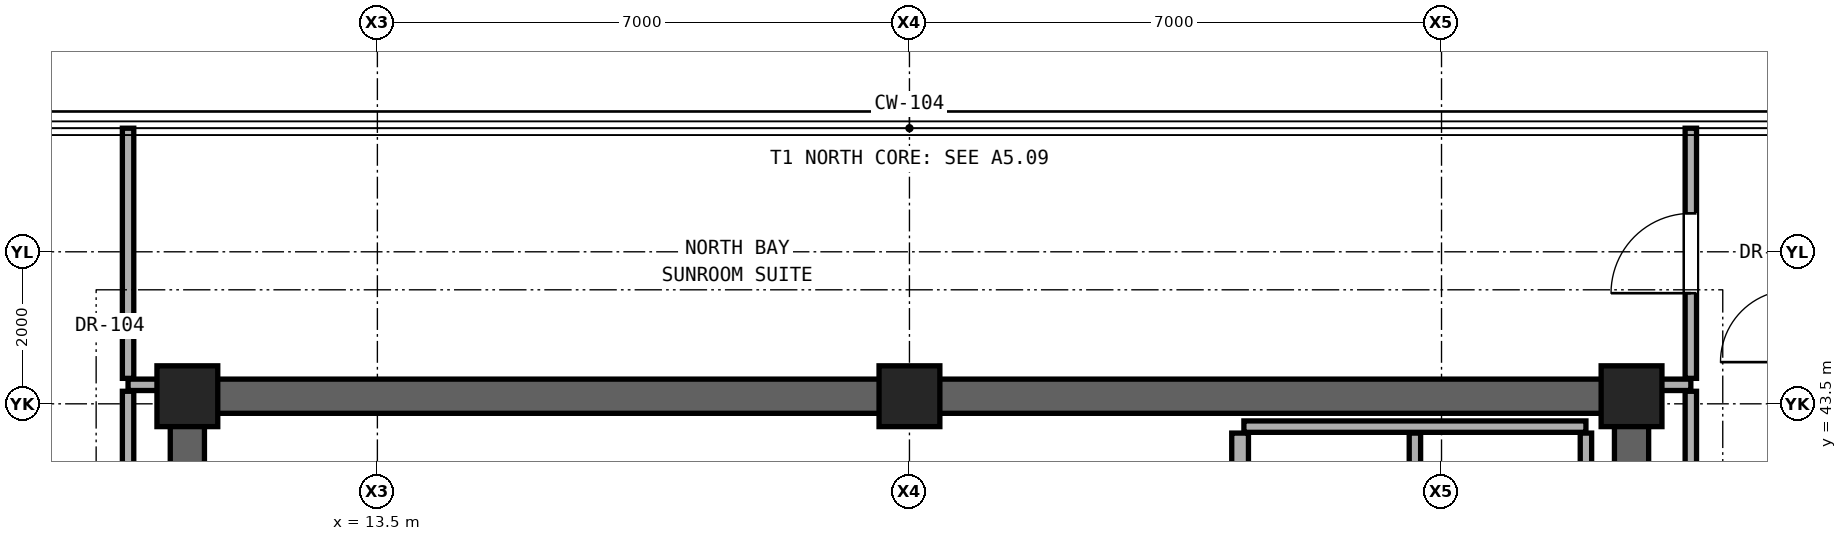
"""IFC4 building model, lengths in metres.
Left out: names, types, materials, properties, quantities, classifications, styles, units other than length and angle.
Written with IfcOpenShell. Run it as: python <this file> out.ifc"""

import sys

from ifc_helpers import new_model, si_unit, direction, frame, frame_2d, origin, origin_2d, place, context, subcontext, project, spatial, rectangle, extrude, element, fill, save


model = new_model("IFC4")
c1 = context("Model", 3, precision=1e-05, world=origin(), true_north=direction((0.0, 1.0)))
c2 = subcontext(c1, "Body", "Model", "MODEL_VIEW")
j1 = project(units=[si_unit("LENGTHUNIT", "METRE"), si_unit("PLANEANGLEUNIT", "RADIAN")], contexts=[c1])
p1 = place(None, origin())
s1 = spatial("IfcSite", under=j1, at=p1, CompositionType="ELEMENT")
p2 = place(p1, origin())
s2 = spatial("IfcBuilding", under=s1, at=p2, CompositionType="ELEMENT")
p3 = place(p2, frame((0.0, 0.0, 242.5)))
s3 = spatial("IfcBuildingStorey", under=s2, at=p3, CompositionType="ELEMENT", Elevation=242.5)
for number, where, z_axis, x_axis in (
    (1, (11.0, 43.6, 0.0), (0.0, 0.0, 1.0), (1.0, 0.0, 0.0)),
    (2, (20.5, 43.6, 0.0), (0.0, 0.0, 1.0), (1.0, 0.0, 0.0)),
    (3, (30.0, 43.6, 0.0), (0.0, 0.0, 1.0), (1.0, 0.0, 0.0)),
):
    element("IfcColumn", number, at=place(p3, frame(where, z_axis=z_axis, x_axis=x_axis)), inside=s3, PredefinedType="COLUMN", context=c2, shape_type="SweptSolid", body=[
        extrude(rectangle(XDim=0.8, YDim=0.8, at=origin_2d()), origin(), (0.0, 0.0, 1.0), 3.3),
    ])
p4 = place(p3, frame((11.0, 43.6, 0.0), z_axis=(0.0, 0.0, 1.0), x_axis=(1.0, 0.0, 0.0)))
e4 = element("IfcWall", 4, at=p4, inside=s3, PredefinedType="SHEAR", context=c2, shape_type="SweptSolid", body=[
    extrude(rectangle(XDim=19.0, YDim=0.45, at=frame_2d((9.5, 0.0))), origin(), (0.0, 0.0, 1.0), 3.1),
])
for number, where, z_axis, x_axis in (
    (5, (11.0, 37.6, 0.0), (0.0, 0.0, 1.0), (0.0, 1.0, 0.0)),
    (6, (30.0, 37.6, 0.0), (0.0, 0.0, 1.0), (0.0, 1.0, 0.0)),
):
    element("IfcWall", number, at=place(p3, frame(where, z_axis=z_axis, x_axis=x_axis)), inside=s3, PredefinedType="SHEAR", context=c2, shape_type="SweptSolid", body=[
        extrude(rectangle(XDim=6.0, YDim=0.45, at=frame_2d((3.0, 0.0))), origin(), (0.0, 0.0, 1.0), 3.1),
    ])
p5 = place(p3, frame((24.9, 43.2, 0.0), z_axis=(0.0, 0.0, 1.0), x_axis=(1.0, 0.0, 0.0)))
e7 = element("IfcWall", 7, at=p5, inside=s3, PredefinedType="PARTITIONING", context=c2, shape_type="SweptSolid", body=[
    extrude(rectangle(XDim=4.5, YDim=0.15, at=frame_2d((2.25, 0.0))), origin(), (0.0, 0.0, 1.0), 3.1),
])
for number, where, z_axis, x_axis in (
    (8, (10.22, 43.75, 0.0), (0.0, 0.0, 1.0), (1.0, 0.0, 0.0)),
    (9, (30.22, 43.75, 0.0), (0.0, 0.0, 1.0), (1.0, 0.0, 0.0)),
):
    element("IfcWall", number, at=place(p3, frame(where, z_axis=z_axis, x_axis=x_axis)), inside=s3, PredefinedType="PARTITIONING", context=c2, shape_type="SweptSolid", body=[
        extrude(rectangle(XDim=0.56, YDim=0.15, at=frame_2d((0.28, 0.0))), origin(), (0.0, 0.0, 1.0), 3.1),
    ])
p6 = place(p3, frame((10.22, 34.535, 0.0), z_axis=(0.0, 0.0, 1.0), x_axis=(0.0, 1.0, 0.0)))
e10 = element("IfcWall", 10, at=p6, inside=s3, PredefinedType="PARTITIONING", context=c2, shape_type="SweptSolid", body=[
    extrude(rectangle(XDim=9.13, YDim=0.15, at=frame_2d((4.565, 0.0))), origin(), (0.0, 0.0, 1.0), 2.492),
])
p7 = place(p3, frame((10.22, 43.835, 0.0), z_axis=(0.0, 0.0, 1.0), x_axis=(0.0, 1.0, 0.0)))
e11 = element("IfcWall", 11, at=p7, inside=s3, PredefinedType="PARTITIONING", context=c2, shape_type="SweptSolid", body=[
    extrude(rectangle(XDim=3.291, YDim=0.15, at=frame_2d((1.646, 0.0))), origin(), (0.0, 0.0, 1.0), 3.1),
])
p8 = place(p3, frame((24.85, 40.26, 0.0), z_axis=(0.0, 0.0, 1.0), x_axis=(0.0, 1.0, 0.0)))
e12 = element("IfcWall", 12, at=p8, inside=s3, PredefinedType="SOLIDWALL", context=c2, shape_type="SweptSolid", body=[
    extrude(rectangle(XDim=2.855, YDim=0.22, at=frame_2d((1.427, 0.0))), origin(), (0.0, 0.0, 1.0), 3.1),
])
for number, where, z_axis, x_axis in (
    (13, (27.15, 37.82, 0.0), (0.0, 0.0, 1.0), (0.0, 1.0, 0.0)),
    (14, (29.4, 37.82, 0.0), (0.0, 0.0, 1.0), (0.0, 1.0, 0.0)),
):
    element("IfcWall", number, at=place(p3, frame(where, z_axis=z_axis, x_axis=x_axis)), inside=s3, PredefinedType="PARTITIONING", context=c2, shape_type="SweptSolid", body=[
        extrude(rectangle(XDim=5.295, YDim=0.15, at=frame_2d((2.647, 0.0))), origin(), (0.0, 0.0, 1.0), 3.1),
    ])
p9 = place(p3, frame((30.78, 34.57, 0.0), z_axis=(0.0, 0.0, 1.0), x_axis=(0.0, 1.0, 0.0)))
e15 = element("IfcWall", 15, at=p9, inside=s3, PredefinedType="PARTITIONING", context=c2, shape_type="SweptSolid", body=[
    extrude(rectangle(XDim=9.095, YDim=0.15, at=frame_2d((4.547, 0.0))), origin(), (0.0, 0.0, 1.0), 2.492),
])
p10 = place(p3, frame((30.78, 43.835, 0.0), z_axis=(0.0, 0.0, 1.0), x_axis=(0.0, 1.0, 0.0)))
e16 = element("IfcWall", 16, at=p10, inside=s3, PredefinedType="PARTITIONING", context=c2, shape_type="SweptSolid", body=[
    extrude(rectangle(XDim=3.291, YDim=0.15, at=frame_2d((1.646, 0.0))), origin(), (0.0, 0.0, 1.0), 3.1),
])
p11 = place(p10, frame((1.121, 0.0, 0.0)))
e17 = element("IfcOpeningElement", 17, at=p11, cuts=e16, PredefinedType="OPENING", context=c2, shape_type="SweptSolid", body=[
    extrude(rectangle(XDim=1.05, YDim=2.2, at=frame_2d((0.525, 1.1))), frame((0.0, 0.085, 0.0), z_axis=(0.0, -1.0, 0.0), x_axis=(1.0, 0.0, 0.0)), (0.0, 0.0, 1.0), 0.17),
])
p12 = place(p11, origin())
e18 = element("IfcDoor", 18, at=p12, inside=s3, OperationType="SINGLE_SWING_LEFT", PredefinedType="DOOR", context=c2, shape_type="SweptSolid", body=[
    extrude(rectangle(XDim=1.05, YDim=2.2, at=frame_2d((0.525, 1.1))), frame((0.0, 0.025, 0.0), z_axis=(0.0, -1.0, 0.0), x_axis=(1.0, 0.0, 0.0)), (0.0, 0.0, 1.0), 0.05),
])
fill(e17, e18)
save(model, sys.argv[1])
